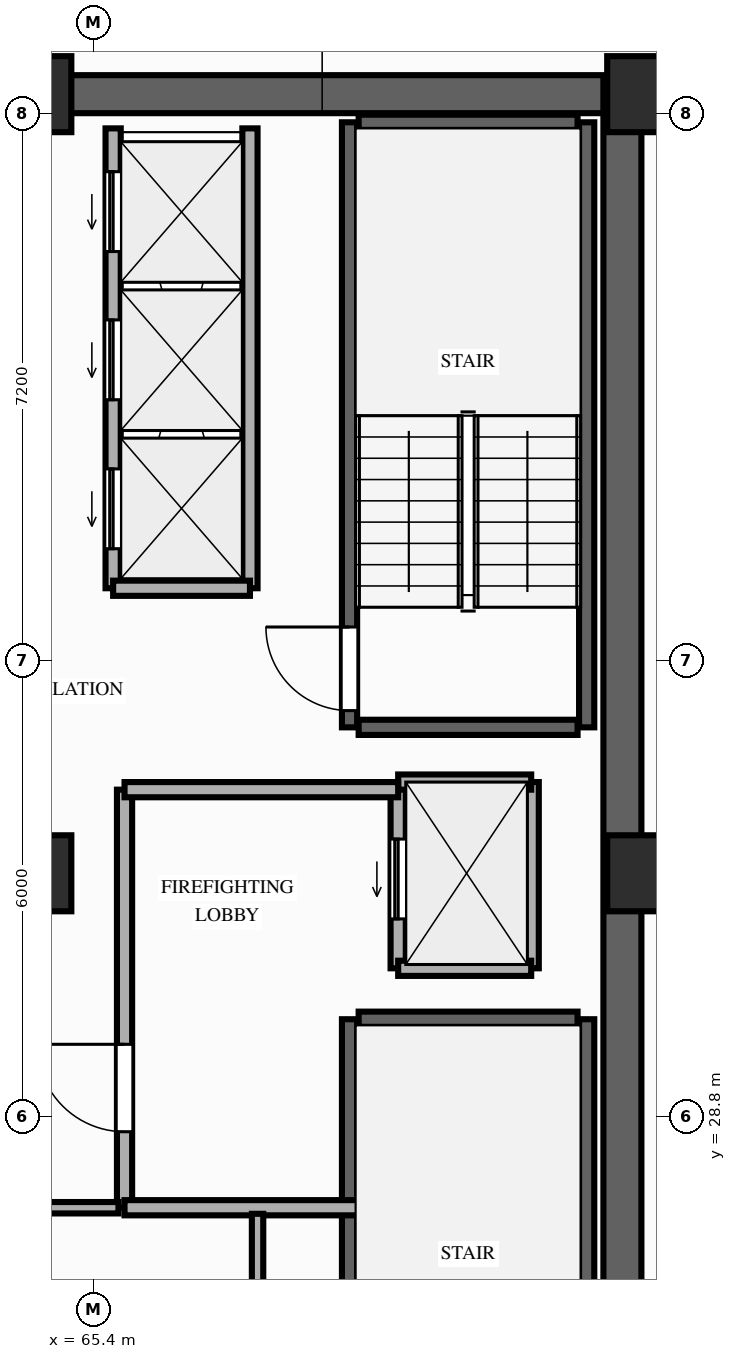
"""IFC4 building model, lengths in metres.
Left out: names, types, materials, properties, quantities, classifications, styles, units other than length and angle.
Written with IfcOpenShell. Run it as: python <this file> out.ifc"""

import sys

from ifc_helpers import new_model, si_unit, direction, frame, frame_2d, origin, origin_2d, place, context, subcontext, project, spatial, rectangle, extrude, element, fill, save


model = new_model("IFC4")
c1 = context("Model", 3, precision=1e-05, world=origin(), true_north=direction((0.0, 1.0)))
c2 = subcontext(c1, "Body", "Model", "MODEL_VIEW")
j1 = project(units=[si_unit("LENGTHUNIT", "METRE"), si_unit("PLANEANGLEUNIT", "RADIAN")], contexts=[c1])
p1 = place(None, origin())
s1 = spatial("IfcSite", under=j1, at=p1, CompositionType="ELEMENT")
p2 = place(p1, origin())
s2 = spatial("IfcBuilding", under=s1, at=p2, CompositionType="ELEMENT")
p3 = place(p2, frame((0.0, 0.0, 36.6)))
s3 = spatial("IfcBuildingStorey", under=s2, at=p3, CompositionType="ELEMENT", Elevation=36.6)
for number, where, z_axis, x_axis in (
    (1, (64.6, 32.0, 0.0), (0.0, 0.0, 1.0), (1.0, 0.0, 0.0)),
    (2, (72.65, 32.0, 0.0), (0.0, 0.0, 1.0), (1.0, 0.0, 0.0)),
    (3, (64.6, 42.25, 0.0), (0.0, 0.0, 1.0), (1.0, 0.0, 0.0)),
    (4, (72.65, 42.25, 0.0), (0.0, 0.0, 1.0), (1.0, 0.0, 0.0)),
):
    element("IfcColumn", number, at=place(p3, frame(where, z_axis=z_axis, x_axis=x_axis)), inside=s3, PredefinedType="COLUMN", context=c2, shape_type="SweptSolid", body=[
        extrude(rectangle(XDim=1.0, YDim=1.0, at=origin_2d()), origin(), (0.0, 0.0, 1.0), 3.2),
    ])
p4 = place(p3, frame((72.35, 22.0, 0.0), z_axis=(0.0, 0.0, 1.0), x_axis=(0.0, 1.0, 0.0)))
e5 = element("IfcWall", 5, at=p4, inside=s3, PredefinedType="SHEAR", context=c2, shape_type="SweptSolid", body=[
    extrude(rectangle(XDim=20.25, YDim=0.5, at=frame_2d((10.125, 0.0))), origin(), (0.0, 0.0, 1.0), 2.96),
])
p5 = place(p3, frame((64.6, 42.25, 0.0), z_axis=(0.0, 0.0, 1.0), x_axis=(1.0, 0.0, 0.0)))
e6 = element("IfcWall", 6, at=p5, inside=s3, PredefinedType="SHEAR", context=c2, shape_type="SweptSolid", body=[
    extrude(rectangle(XDim=7.5, YDim=0.5, at=frame_2d((3.75, 0.0))), origin(), (0.0, 0.0, 1.0), 2.96),
])
p6 = place(p3, frame((68.76, 22.26, 0.0), z_axis=(0.0, 0.0, 1.0), x_axis=(0.0, 1.0, 0.0)))
e7 = element("IfcWall", 7, at=p6, inside=s3, PredefinedType="SHEAR", context=c2, shape_type="SweptSolid", body=[
    extrude(rectangle(XDim=7.82, YDim=0.2, at=frame_2d((3.91, 0.0))), origin(), (0.0, 0.0, 1.0), 2.96),
])
p7 = place(p6, frame((0.22, 0.0, 0.0)))
e8 = element("IfcOpeningElement", 8, at=p7, cuts=e7, PredefinedType="OPENING", context=c2, shape_type="SweptSolid", body=[
    extrude(rectangle(XDim=1.1, YDim=2.15, at=frame_2d((0.55, 1.075))), frame((0.0, 0.11, 0.0), z_axis=(0.0, -1.0, 0.0), x_axis=(1.0, 0.0, 0.0)), (0.0, 0.0, 1.0), 0.22),
])
p8 = place(p3, frame((71.88, 22.26, 0.0), z_axis=(0.0, 0.0, 1.0), x_axis=(0.0, 1.0, 0.0)))
e9 = element("IfcWall", 9, at=p8, inside=s3, PredefinedType="SHEAR", context=c2, shape_type="SweptSolid", body=[
    extrude(rectangle(XDim=7.82, YDim=0.2, at=frame_2d((3.91, 0.0))), origin(), (0.0, 0.0, 1.0), 2.96),
])
p9 = place(p3, frame((68.88, 30.08, 0.0), z_axis=(0.0, 0.0, 1.0), x_axis=(1.0, 0.0, 0.0)))
e10 = element("IfcWall", 10, at=p9, inside=s3, PredefinedType="SHEAR", context=c2, shape_type="SweptSolid", body=[
    extrude(rectangle(XDim=2.88, YDim=0.2, at=frame_2d((1.44, 0.0))), origin(), (0.0, 0.0, 1.0), 2.96),
])
p10 = place(p3, frame((68.76, 33.92, 0.0), z_axis=(0.0, 0.0, 1.0), x_axis=(0.0, 1.0, 0.0)))
e11 = element("IfcWall", 11, at=p10, inside=s3, PredefinedType="SHEAR", context=c2, shape_type="SweptSolid", body=[
    extrude(rectangle(XDim=7.96, YDim=0.2, at=frame_2d((3.98, 0.0))), origin(), (0.0, 0.0, 1.0), 2.96),
])
p11 = place(p10, frame((0.22, 0.0, 0.0)))
e12 = element("IfcOpeningElement", 12, at=p11, cuts=e11, PredefinedType="OPENING", context=c2, shape_type="SweptSolid", body=[
    extrude(rectangle(XDim=1.1, YDim=2.15, at=frame_2d((0.55, 1.075))), frame((0.0, 0.11, 0.0), z_axis=(0.0, -1.0, 0.0), x_axis=(1.0, 0.0, 0.0)), (0.0, 0.0, 1.0), 0.22),
])
p12 = place(p3, frame((71.88, 33.92, 0.0), z_axis=(0.0, 0.0, 1.0), x_axis=(0.0, 1.0, 0.0)))
e13 = element("IfcWall", 13, at=p12, inside=s3, PredefinedType="SHEAR", context=c2, shape_type="SweptSolid", body=[
    extrude(rectangle(XDim=7.96, YDim=0.2, at=frame_2d((3.98, 0.0))), origin(), (0.0, 0.0, 1.0), 2.96),
])
for number, where, z_axis, x_axis in (
    (14, (68.88, 41.88, 0.0), (0.0, 0.0, 1.0), (1.0, 0.0, 0.0)),
    (15, (68.88, 33.92, 0.0), (0.0, 0.0, 1.0), (1.0, 0.0, 0.0)),
):
    element("IfcWall", number, at=place(p3, frame(where, z_axis=z_axis, x_axis=x_axis)), inside=s3, PredefinedType="SHEAR", context=c2, shape_type="SweptSolid", body=[
        extrude(rectangle(XDim=2.88, YDim=0.2, at=frame_2d((1.44, 0.0))), origin(), (0.0, 0.0, 1.0), 2.96),
    ])
p13 = place(p3, frame((65.65, 35.75, 0.0), z_axis=(0.0, 0.0, 1.0), x_axis=(0.0, 1.0, 0.0)))
e16 = element("IfcWall", 16, at=p13, inside=s3, PredefinedType="MOVABLE", context=c2, shape_type="SweptSolid", body=[
    extrude(rectangle(XDim=6.05, YDim=0.2, at=frame_2d((3.025, 0.0))), origin(), (0.0, 0.0, 1.0), 2.96),
])
p14 = place(p13, frame((0.52, 0.0, 0.0)))
e17 = element("IfcOpeningElement", 17, at=p14, cuts=e16, PredefinedType="OPENING", context=c2, shape_type="SweptSolid", body=[
    extrude(rectangle(XDim=1.05, YDim=2.15, at=frame_2d((0.525, 1.075))), frame((0.0, 0.11, 0.0), z_axis=(0.0, -1.0, 0.0), x_axis=(1.0, 0.0, 0.0)), (0.0, 0.0, 1.0), 0.22),
])
p15 = place(p13, frame((2.48, 0.0, 0.0)))
e18 = element("IfcOpeningElement", 18, at=p15, cuts=e16, PredefinedType="OPENING", context=c2, shape_type="SweptSolid", body=[
    extrude(rectangle(XDim=1.05, YDim=2.15, at=frame_2d((0.525, 1.075))), frame((0.0, 0.11, 0.0), z_axis=(0.0, -1.0, 0.0), x_axis=(1.0, 0.0, 0.0)), (0.0, 0.0, 1.0), 0.22),
])
p16 = place(p13, frame((4.43, 0.0, 0.0)))
e19 = element("IfcOpeningElement", 19, at=p16, cuts=e16, PredefinedType="OPENING", context=c2, shape_type="SweptSolid", body=[
    extrude(rectangle(XDim=1.05, YDim=2.15, at=frame_2d((0.525, 1.075))), frame((0.0, 0.11, 0.0), z_axis=(0.0, -1.0, 0.0), x_axis=(1.0, 0.0, 0.0)), (0.0, 0.0, 1.0), 0.22),
])
p17 = place(p3, frame((67.45, 35.75, 0.0), z_axis=(0.0, 0.0, 1.0), x_axis=(0.0, 1.0, 0.0)))
e20 = element("IfcWall", 20, at=p17, inside=s3, PredefinedType="MOVABLE", context=c2, shape_type="SweptSolid", body=[
    extrude(rectangle(XDim=6.05, YDim=0.2, at=frame_2d((3.025, 0.0))), origin(), (0.0, 0.0, 1.0), 2.96),
])
p18 = place(p3, frame((65.65, 35.75, 0.0), z_axis=(0.0, 0.0, 1.0), x_axis=(1.0, 0.0, 0.0)))
e21 = element("IfcWall", 21, at=p18, inside=s3, PredefinedType="MOVABLE", context=c2, shape_type="SweptSolid", body=[
    extrude(rectangle(XDim=1.8, YDim=0.2, at=frame_2d((0.9, 0.0))), origin(), (0.0, 0.0, 1.0), 2.96),
])
p19 = place(p3, frame((69.4, 30.75, 0.0), z_axis=(0.0, 0.0, 1.0), x_axis=(0.0, 1.0, 0.0)))
e22 = element("IfcWall", 22, at=p19, inside=s3, PredefinedType="MOVABLE", context=c2, shape_type="SweptSolid", body=[
    extrude(rectangle(XDim=2.45, YDim=0.2, at=frame_2d((1.225, 0.0))), origin(), (0.0, 0.0, 1.0), 2.96),
])
p20 = place(p19, frame((0.65, 0.0, 0.0)))
e23 = element("IfcOpeningElement", 23, at=p20, cuts=e22, PredefinedType="OPENING", context=c2, shape_type="SweptSolid", body=[
    extrude(rectangle(XDim=1.05, YDim=2.15, at=frame_2d((0.525, 1.075))), frame((0.0, 0.11, 0.0), z_axis=(0.0, -1.0, 0.0), x_axis=(1.0, 0.0, 0.0)), (0.0, 0.0, 1.0), 0.22),
])
p21 = place(p3, frame((71.15, 30.75, 0.0), z_axis=(0.0, 0.0, 1.0), x_axis=(0.0, 1.0, 0.0)))
e24 = element("IfcWall", 24, at=p21, inside=s3, PredefinedType="MOVABLE", context=c2, shape_type="SweptSolid", body=[
    extrude(rectangle(XDim=2.45, YDim=0.2, at=frame_2d((1.225, 0.0))), origin(), (0.0, 0.0, 1.0), 2.96),
])
for number, where, z_axis, x_axis in (
    (25, (69.4, 33.2, 0.0), (0.0, 0.0, 1.0), (1.0, 0.0, 0.0)),
    (26, (69.4, 30.75, 0.0), (0.0, 0.0, 1.0), (1.0, 0.0, 0.0)),
):
    element("IfcWall", number, at=place(p3, frame(where, z_axis=z_axis, x_axis=x_axis)), inside=s3, PredefinedType="MOVABLE", context=c2, shape_type="SweptSolid", body=[
        extrude(rectangle(XDim=1.75, YDim=0.2, at=frame_2d((0.875, 0.0))), origin(), (0.0, 0.0, 1.0), 2.96),
    ])
p22 = place(p3, frame((65.8, 27.6, 0.0), z_axis=(0.0, 0.0, 1.0), x_axis=(0.0, 1.0, 0.0)))
e27 = element("IfcWall", 27, at=p22, inside=s3, PredefinedType="PARTITIONING", context=c2, shape_type="SweptSolid", body=[
    extrude(rectangle(XDim=5.5, YDim=0.2, at=frame_2d((2.75, 0.0))), origin(), (0.0, 0.0, 1.0), 2.96),
])
p23 = place(p22, frame((1.0, 0.0, 0.0)))
e28 = element("IfcOpeningElement", 28, at=p23, cuts=e27, PredefinedType="OPENING", context=c2, shape_type="SweptSolid", body=[
    extrude(rectangle(XDim=1.15, YDim=2.15, at=frame_2d((0.575, 1.075))), frame((0.0, 0.11, 0.0), z_axis=(0.0, -1.0, 0.0), x_axis=(1.0, 0.0, 0.0)), (0.0, 0.0, 1.0), 0.22),
])
p24 = place(p3, frame((65.8, 33.1, 0.0), z_axis=(0.0, 0.0, 1.0), x_axis=(1.0, 0.0, 0.0)))
e29 = element("IfcWall", 29, at=p24, inside=s3, PredefinedType="PARTITIONING", context=c2, shape_type="SweptSolid", body=[
    extrude(rectangle(XDim=3.6, YDim=0.2, at=frame_2d((1.8, 0.0))), origin(), (0.0, 0.0, 1.0), 2.96),
])
p25 = place(p3, frame((65.8, 27.6, 0.0), z_axis=(0.0, 0.0, 1.0), x_axis=(1.0, 0.0, 0.0)))
e30 = element("IfcWall", 30, at=p25, inside=s3, PredefinedType="PARTITIONING", context=c2, shape_type="SweptSolid", body=[
    extrude(rectangle(XDim=3.4, YDim=0.2, at=frame_2d((1.7, 0.0))), origin(), (0.0, 0.0, 1.0), 2.96),
])
p26 = place(p3, frame((67.55, 21.05, 0.0), z_axis=(0.0, 0.0, 1.0), x_axis=(0.0, 1.0, 0.0)))
e31 = element("IfcWall", 31, at=p26, inside=s3, PredefinedType="PARTITIONING", context=c2, shape_type="SweptSolid", body=[
    extrude(rectangle(XDim=6.47, YDim=0.15, at=frame_2d((3.235, 0.0))), origin(), (0.0, 0.0, 1.0), 2.45),
])
p27 = place(p3, frame((64.25, 27.6, 0.0), z_axis=(0.0, 0.0, 1.0), x_axis=(1.0, 0.0, 0.0)))
e32 = element("IfcWall", 32, at=p27, inside=s3, PredefinedType="PARTITIONING", context=c2, shape_type="SweptSolid", body=[
    extrude(rectangle(XDim=1.47, YDim=0.15, at=frame_2d((0.735, 0.0))), origin(), (0.0, 0.0, 1.0), 2.45),
])
p28 = place(p11, origin())
e33 = element("IfcDoor", 33, at=p28, inside=s3, OperationType="SINGLE_SWING_RIGHT", PredefinedType="DOOR", context=c2, shape_type="SweptSolid", body=[
    extrude(rectangle(XDim=1.1, YDim=2.15, at=frame_2d((0.55, 1.075))), frame((0.0, 0.025, 0.0), z_axis=(0.0, -1.0, 0.0), x_axis=(1.0, 0.0, 0.0)), (0.0, 0.0, 1.0), 0.05),
])
fill(e12, e33)
p29 = place(p14, origin())
e34 = element("IfcDoor", 34, at=p29, inside=s3, OperationType="SLIDING_TO_LEFT", PredefinedType="DOOR", context=c2, shape_type="SweptSolid", body=[
    extrude(rectangle(XDim=1.05, YDim=2.15, at=frame_2d((0.525, 1.075))), frame((0.0, 0.025, 0.0), z_axis=(0.0, -1.0, 0.0), x_axis=(1.0, 0.0, 0.0)), (0.0, 0.0, 1.0), 0.05),
])
fill(e17, e34)
p30 = place(p15, origin())
e35 = element("IfcDoor", 35, at=p30, inside=s3, OperationType="SLIDING_TO_LEFT", PredefinedType="DOOR", context=c2, shape_type="SweptSolid", body=[
    extrude(rectangle(XDim=1.05, YDim=2.15, at=frame_2d((0.525, 1.075))), frame((0.0, 0.025, 0.0), z_axis=(0.0, -1.0, 0.0), x_axis=(1.0, 0.0, 0.0)), (0.0, 0.0, 1.0), 0.05),
])
fill(e18, e35)
p31 = place(p16, origin())
e36 = element("IfcDoor", 36, at=p31, inside=s3, OperationType="SLIDING_TO_LEFT", PredefinedType="DOOR", context=c2, shape_type="SweptSolid", body=[
    extrude(rectangle(XDim=1.05, YDim=2.15, at=frame_2d((0.525, 1.075))), frame((0.0, 0.025, 0.0), z_axis=(0.0, -1.0, 0.0), x_axis=(1.0, 0.0, 0.0)), (0.0, 0.0, 1.0), 0.05),
])
fill(e19, e36)
p32 = place(p20, origin())
e37 = element("IfcDoor", 37, at=p32, inside=s3, OperationType="SLIDING_TO_LEFT", PredefinedType="DOOR", context=c2, shape_type="SweptSolid", body=[
    extrude(rectangle(XDim=1.05, YDim=2.15, at=frame_2d((0.525, 1.075))), frame((0.0, 0.025, 0.0), z_axis=(0.0, -1.0, 0.0), x_axis=(1.0, 0.0, 0.0)), (0.0, 0.0, 1.0), 0.05),
])
fill(e23, e37)
p33 = place(p23, origin())
e38 = element("IfcDoor", 38, at=p33, inside=s3, OperationType="SINGLE_SWING_RIGHT", PredefinedType="DOOR", context=c2, shape_type="SweptSolid", body=[
    extrude(rectangle(XDim=1.15, YDim=2.15, at=frame_2d((0.575, 1.075))), frame((0.0, 0.025, 0.0), z_axis=(0.0, -1.0, 0.0), x_axis=(1.0, 0.0, 0.0)), (0.0, 0.0, 1.0), 0.05),
])
fill(e28, e38)
save(model, sys.argv[1])
